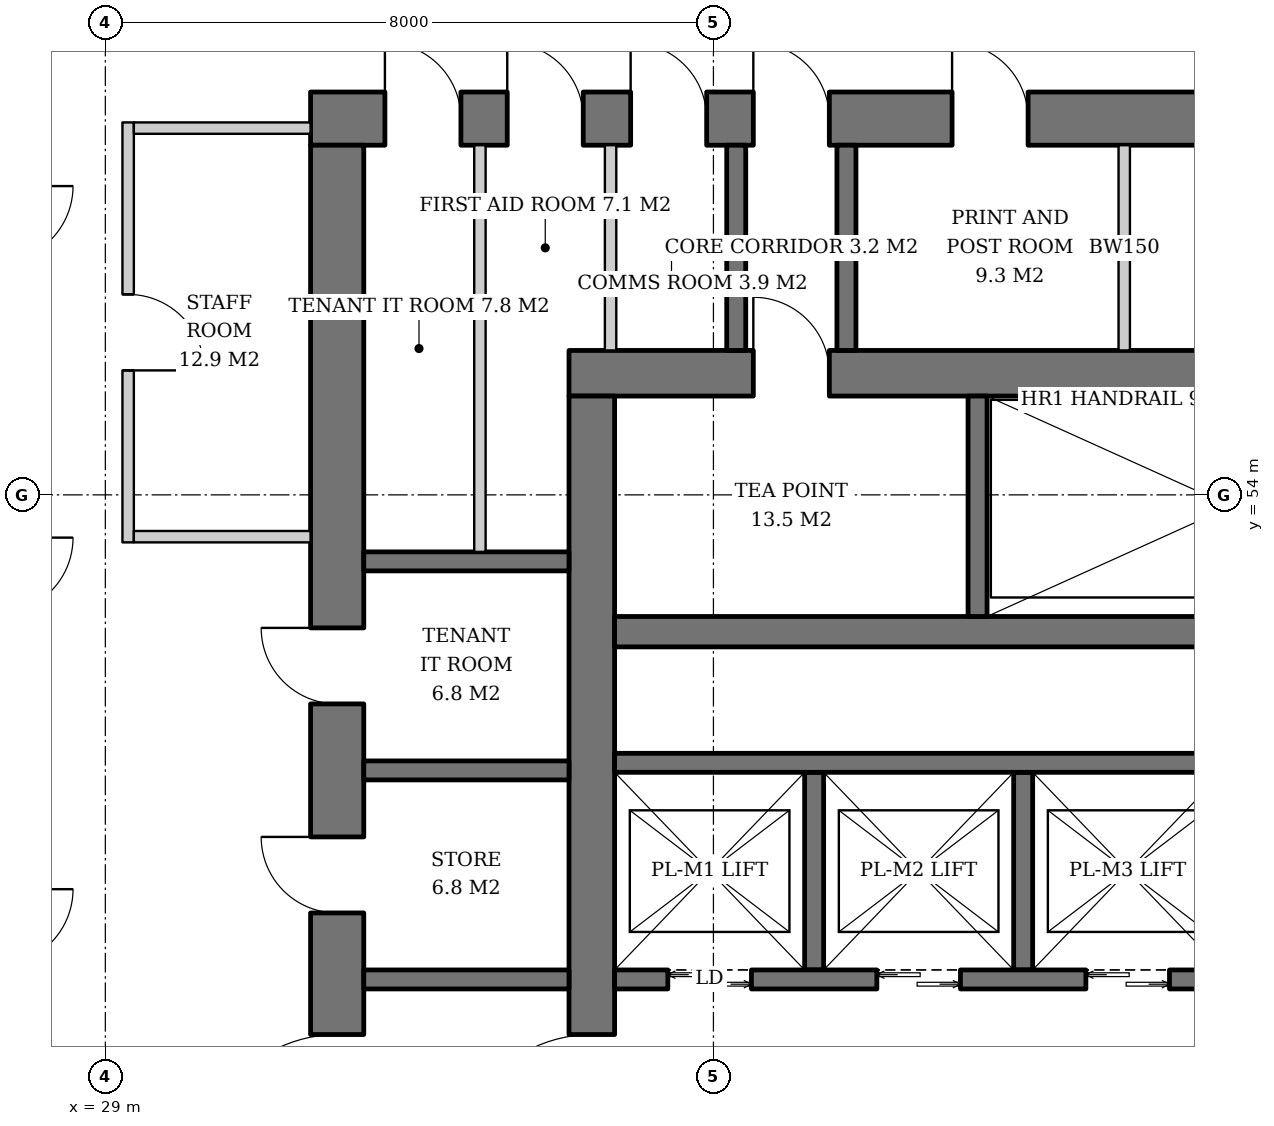
"""IFC4 building model, lengths in metres.
Left out: names, types, materials, properties, quantities, classifications, styles, units other than length and angle.
Written with IfcOpenShell. Run it as: python <this file> out.ifc"""

import sys

from ifc_helpers import new_model, si_unit, direction, frame, frame_2d, origin, place, context, subcontext, project, spatial, rectangle, extrude, element, fill, save


model = new_model("IFC4")
c1 = context("Model", 3, precision=1e-05, world=origin(), true_north=direction((0.0, 1.0)))
c2 = subcontext(c1, "Body", "Model", "MODEL_VIEW")
j1 = project(units=[si_unit("LENGTHUNIT", "METRE"), si_unit("PLANEANGLEUNIT", "RADIAN")], contexts=[c1])
p1 = place(None, origin())
s1 = spatial("IfcSite", under=j1, at=p1, CompositionType="ELEMENT")
p2 = place(p1, origin())
s2 = spatial("IfcBuilding", under=s1, at=p2, CompositionType="ELEMENT")
p3 = place(p2, frame((0.0, 0.0, 142.6)))
s3 = spatial("IfcBuildingStorey", under=s2, at=p3, CompositionType="ELEMENT", Elevation=142.6)
p4 = place(p3, frame((35.1, 55.6, 0.0), z_axis=(0.0, 0.0, 1.0), x_axis=(1.0, 0.0, 0.0)))
e1 = element("IfcWall", 1, at=p4, inside=s3, PredefinedType="SHEAR", context=c2, shape_type="SweptSolid", body=[
    extrude(rectangle(XDim=19.8, YDim=0.6, at=frame_2d((9.9, 0.0))), origin(), (0.0, 0.0, 1.0), 3.8),
])
p5 = place(p4, frame((14.54, 0.0, 0.0)))
e2 = element("IfcOpeningElement", 2, at=p5, cuts=e1, PredefinedType="OPENING", context=c2, shape_type="SweptSolid", body=[
    extrude(rectangle(XDim=1.0, YDim=2.1, at=frame_2d((0.5, 1.05))), frame((0.0, 0.31, 0.0), z_axis=(0.0, -1.0, 0.0), x_axis=(1.0, 0.0, 0.0)), (0.0, 0.0, 1.0), 0.62),
])
p6 = place(p4, frame((2.425, 0.0, 0.0)))
e3 = element("IfcOpeningElement", 3, at=p6, cuts=e1, PredefinedType="OPENING", context=c2, shape_type="SweptSolid", body=[
    extrude(rectangle(XDim=1.0, YDim=2.1, at=frame_2d((0.5, 1.05))), frame((0.0, 0.31, 0.0), z_axis=(0.0, -1.0, 0.0), x_axis=(1.0, 0.0, 0.0)), (0.0, 0.0, 1.0), 0.62),
])
p7 = place(p3, frame((35.4, 36.7, 0.0), z_axis=(0.0, 0.0, 1.0), x_axis=(0.0, 1.0, 0.0)))
e4 = element("IfcWall", 4, at=p7, inside=s3, PredefinedType="SHEAR", context=c2, shape_type="SweptSolid", body=[
    extrude(rectangle(XDim=18.6, YDim=0.6, at=frame_2d((9.3, 0.0))), origin(), (0.0, 0.0, 1.0), 3.8),
])
p8 = place(p7, frame((8.4, 0.0, 0.0)))
e5 = element("IfcOpeningElement", 5, at=p8, cuts=e4, PredefinedType="OPENING", context=c2, shape_type="SweptSolid", body=[
    extrude(rectangle(XDim=1.8, YDim=2.4, at=frame_2d((0.9, 1.2))), frame((0.0, 0.31, 0.0), z_axis=(0.0, -1.0, 0.0), x_axis=(1.0, 0.0, 0.0)), (0.0, 0.0, 1.0), 0.62),
])
p9 = place(p3, frame((31.7, 58.95, 0.0), z_axis=(0.0, 0.0, 1.0), x_axis=(1.0, 0.0, 0.0)))
e6 = element("IfcWall", 6, at=p9, inside=s3, PredefinedType="SHEAR", context=c2, shape_type="SweptSolid", body=[
    extrude(rectangle(XDim=26.6, YDim=0.7, at=frame_2d((13.3, 0.0))), origin(), (0.0, 0.0, 1.0), 3.8),
])
p10 = place(p9, frame((17.94, 0.0, 0.0)))
e7 = element("IfcOpeningElement", 7, at=p10, cuts=e6, PredefinedType="OPENING", context=c2, shape_type="SweptSolid", body=[
    extrude(rectangle(XDim=1.0, YDim=2.1, at=frame_2d((0.5, 1.05))), frame((0.0, 0.36, 0.0), z_axis=(0.0, -1.0, 0.0), x_axis=(1.0, 0.0, 0.0)), (0.0, 0.0, 1.0), 0.72),
])
p11 = place(p9, frame((5.825, 0.0, 0.0)))
e8 = element("IfcOpeningElement", 8, at=p11, cuts=e6, PredefinedType="OPENING", context=c2, shape_type="SweptSolid", body=[
    extrude(rectangle(XDim=1.0, YDim=2.1, at=frame_2d((0.5, 1.05))), frame((0.0, 0.36, 0.0), z_axis=(0.0, -1.0, 0.0), x_axis=(1.0, 0.0, 0.0)), (0.0, 0.0, 1.0), 0.72),
])
p12 = place(p9, frame((0.978, 0.0, 0.0)))
e9 = element("IfcOpeningElement", 9, at=p12, cuts=e6, PredefinedType="OPENING", context=c2, shape_type="SweptSolid", body=[
    extrude(rectangle(XDim=1.0, YDim=2.1, at=frame_2d((0.5, 1.05))), frame((0.0, 0.36, 0.0), z_axis=(0.0, -1.0, 0.0), x_axis=(1.0, 0.0, 0.0)), (0.0, 0.0, 1.0), 0.72),
])
p13 = place(p9, frame((2.587, 0.0, 0.0)))
e10 = element("IfcOpeningElement", 10, at=p13, cuts=e6, PredefinedType="OPENING", context=c2, shape_type="SweptSolid", body=[
    extrude(rectangle(XDim=1.0, YDim=2.1, at=frame_2d((0.5, 1.05))), frame((0.0, 0.36, 0.0), z_axis=(0.0, -1.0, 0.0), x_axis=(1.0, 0.0, 0.0)), (0.0, 0.0, 1.0), 0.72),
])
p14 = place(p9, frame((4.211, 0.0, 0.0)))
e11 = element("IfcOpeningElement", 11, at=p14, cuts=e6, PredefinedType="OPENING", context=c2, shape_type="SweptSolid", body=[
    extrude(rectangle(XDim=1.0, YDim=2.1, at=frame_2d((0.5, 1.05))), frame((0.0, 0.36, 0.0), z_axis=(0.0, -1.0, 0.0), x_axis=(1.0, 0.0, 0.0)), (0.0, 0.0, 1.0), 0.72),
])
p15 = place(p9, frame((8.44, 0.0, 0.0)))
e12 = element("IfcOpeningElement", 12, at=p15, cuts=e6, PredefinedType="OPENING", context=c2, shape_type="SweptSolid", body=[
    extrude(rectangle(XDim=1.0, YDim=2.1, at=frame_2d((0.5, 1.05))), frame((0.0, 0.36, 0.0), z_axis=(0.0, -1.0, 0.0), x_axis=(1.0, 0.0, 0.0)), (0.0, 0.0, 1.0), 0.72),
])
p16 = place(p9, frame((13.342, 0.0, 0.0)))
e13 = element("IfcOpeningElement", 13, at=p16, cuts=e6, PredefinedType="OPENING", context=c2, shape_type="SweptSolid", body=[
    extrude(rectangle(XDim=1.0, YDim=2.1, at=frame_2d((0.5, 1.05))), frame((0.0, 0.36, 0.0), z_axis=(0.0, -1.0, 0.0), x_axis=(1.0, 0.0, 0.0)), (0.0, 0.0, 1.0), 0.72),
])
p17 = place(p9, frame((22.4, 0.0, 0.0)))
e14 = element("IfcOpeningElement", 14, at=p17, cuts=e6, PredefinedType="OPENING", context=c2, shape_type="SweptSolid", body=[
    extrude(rectangle(XDim=1.0, YDim=2.1, at=frame_2d((0.5, 1.05))), frame((0.0, 0.36, 0.0), z_axis=(0.0, -1.0, 0.0), x_axis=(1.0, 0.0, 0.0)), (0.0, 0.0, 1.0), 0.72),
])
p18 = place(p3, frame((32.05, 33.4, 0.0), z_axis=(0.0, 0.0, 1.0), x_axis=(0.0, 1.0, 0.0)))
e15 = element("IfcWall", 15, at=p18, inside=s3, PredefinedType="SHEAR", context=c2, shape_type="SweptSolid", body=[
    extrude(rectangle(XDim=25.2, YDim=0.7, at=frame_2d((12.6, 0.0))), origin(), (0.0, 0.0, 1.0), 3.8),
])
p19 = place(p18, frame((11.7, 0.0, 0.0)))
e16 = element("IfcOpeningElement", 16, at=p19, cuts=e15, PredefinedType="OPENING", context=c2, shape_type="SweptSolid", body=[
    extrude(rectangle(XDim=1.8, YDim=2.4, at=frame_2d((0.9, 1.2))), frame((0.0, 0.36, 0.0), z_axis=(0.0, -1.0, 0.0), x_axis=(1.0, 0.0, 0.0)), (0.0, 0.0, 1.0), 0.72),
])
p20 = place(p18, frame((3.6, 0.0, 0.0)))
e17 = element("IfcOpeningElement", 17, at=p20, cuts=e15, PredefinedType="OPENING", context=c2, shape_type="SweptSolid", body=[
    extrude(rectangle(XDim=1.0, YDim=2.1, at=frame_2d((0.5, 1.05))), frame((0.0, 0.36, 0.0), z_axis=(0.0, -1.0, 0.0), x_axis=(1.0, 0.0, 0.0)), (0.0, 0.0, 1.0), 0.72),
])
p21 = place(p18, frame((6.35, 0.0, 0.0)))
e18 = element("IfcOpeningElement", 18, at=p21, cuts=e15, PredefinedType="OPENING", context=c2, shape_type="SweptSolid", body=[
    extrude(rectangle(XDim=1.0, YDim=2.1, at=frame_2d((0.5, 1.05))), frame((0.0, 0.36, 0.0), z_axis=(0.0, -1.0, 0.0), x_axis=(1.0, 0.0, 0.0)), (0.0, 0.0, 1.0), 0.72),
])
p22 = place(p18, frame((9.1, 0.0, 0.0)))
e19 = element("IfcOpeningElement", 19, at=p22, cuts=e15, PredefinedType="OPENING", context=c2, shape_type="SweptSolid", body=[
    extrude(rectangle(XDim=1.0, YDim=2.1, at=frame_2d((0.5, 1.05))), frame((0.0, 0.36, 0.0), z_axis=(0.0, -1.0, 0.0), x_axis=(1.0, 0.0, 0.0)), (0.0, 0.0, 1.0), 0.72),
])
p23 = place(p18, frame((15.1, 0.0, 0.0)))
e20 = element("IfcOpeningElement", 20, at=p23, cuts=e15, PredefinedType="OPENING", context=c2, shape_type="SweptSolid", body=[
    extrude(rectangle(XDim=1.0, YDim=2.1, at=frame_2d((0.5, 1.05))), frame((0.0, 0.36, 0.0), z_axis=(0.0, -1.0, 0.0), x_axis=(1.0, 0.0, 0.0)), (0.0, 0.0, 1.0), 0.72),
])
p24 = place(p18, frame((17.85, 0.0, 0.0)))
e21 = element("IfcOpeningElement", 21, at=p24, cuts=e15, PredefinedType="OPENING", context=c2, shape_type="SweptSolid", body=[
    extrude(rectangle(XDim=1.0, YDim=2.1, at=frame_2d((0.5, 1.05))), frame((0.0, 0.36, 0.0), z_axis=(0.0, -1.0, 0.0), x_axis=(1.0, 0.0, 0.0)), (0.0, 0.0, 1.0), 0.72),
])
p25 = place(p3, frame((35.7, 52.2, 0.0), z_axis=(0.0, 0.0, 1.0), x_axis=(1.0, 0.0, 0.0)))
e22 = element("IfcWall", 22, at=p25, inside=s3, PredefinedType="SHEAR", context=c2, shape_type="SweptSolid", body=[
    extrude(rectangle(XDim=18.6, YDim=0.4, at=frame_2d((9.3, 0.0))), origin(), (0.0, 0.0, 1.0), 3.8),
])
p26 = place(p3, frame((40.475, 52.4, 0.0), z_axis=(0.0, 0.0, 1.0), x_axis=(0.0, 1.0, 0.0)))
e23 = element("IfcWall", 23, at=p26, inside=s3, PredefinedType="SHEAR", context=c2, shape_type="SweptSolid", body=[
    extrude(rectangle(XDim=2.9, YDim=0.25, at=frame_2d((1.45, 0.0))), origin(), (0.0, 0.0, 1.0), 3.8),
])
for number, where, z_axis, x_axis in (
    (24, (38.325, 47.75, 0.0), (0.0, 0.0, 1.0), (0.0, 1.0, 0.0)),
    (25, (41.075, 47.75, 0.0), (0.0, 0.0, 1.0), (0.0, 1.0, 0.0)),
):
    element("IfcWall", number, at=place(p3, frame(where, z_axis=z_axis, x_axis=x_axis)), inside=s3, PredefinedType="SHEAR", context=c2, shape_type="SweptSolid", body=[
        extrude(rectangle(XDim=2.6, YDim=0.25, at=frame_2d((1.3, 0.0))), origin(), (0.0, 0.0, 1.0), 3.8),
    ])
p27 = place(p3, frame((35.7, 50.475, 0.0), z_axis=(0.0, 0.0, 1.0), x_axis=(1.0, 0.0, 0.0)))
e26 = element("IfcWall", 26, at=p27, inside=s3, PredefinedType="SHEAR", context=c2, shape_type="SweptSolid", body=[
    extrude(rectangle(XDim=11.0, YDim=0.25, at=frame_2d((5.5, 0.0))), origin(), (0.0, 0.0, 1.0), 3.8),
])
p28 = place(p3, frame((35.7, 47.625, 0.0), z_axis=(0.0, 0.0, 1.0), x_axis=(1.0, 0.0, 0.0)))
e27 = element("IfcWall", 27, at=p28, inside=s3, PredefinedType="SHEAR", context=c2, shape_type="SweptSolid", body=[
    extrude(rectangle(XDim=12.83, YDim=0.25, at=frame_2d((6.415, 0.0))), origin(), (0.0, 0.0, 1.0), 3.8),
])
p29 = place(p28, frame((0.7, 0.0, 0.0)))
e28 = element("IfcOpeningElement", 28, at=p29, cuts=e27, PredefinedType="OPENING", context=c2, shape_type="SweptSolid", body=[
    extrude(rectangle(XDim=1.1, YDim=2.2, at=frame_2d((0.55, 1.1))), frame((0.0, 0.135, 0.0), z_axis=(0.0, -1.0, 0.0), x_axis=(1.0, 0.0, 0.0)), (0.0, 0.0, 1.0), 0.27),
])
p30 = place(p28, frame((3.45, 0.0, 0.0)))
e29 = element("IfcOpeningElement", 29, at=p30, cuts=e27, PredefinedType="OPENING", context=c2, shape_type="SweptSolid", body=[
    extrude(rectangle(XDim=1.1, YDim=2.2, at=frame_2d((0.55, 1.1))), frame((0.0, 0.135, 0.0), z_axis=(0.0, -1.0, 0.0), x_axis=(1.0, 0.0, 0.0)), (0.0, 0.0, 1.0), 0.27),
])
p31 = place(p28, frame((6.2, 0.0, 0.0)))
e30 = element("IfcOpeningElement", 30, at=p31, cuts=e27, PredefinedType="OPENING", context=c2, shape_type="SweptSolid", body=[
    extrude(rectangle(XDim=1.1, YDim=2.2, at=frame_2d((0.55, 1.1))), frame((0.0, 0.135, 0.0), z_axis=(0.0, -1.0, 0.0), x_axis=(1.0, 0.0, 0.0)), (0.0, 0.0, 1.0), 0.27),
])
p32 = place(p28, frame((8.95, 0.0, 0.0)))
e31 = element("IfcOpeningElement", 31, at=p32, cuts=e27, PredefinedType="OPENING", context=c2, shape_type="SweptSolid", body=[
    extrude(rectangle(XDim=1.1, YDim=2.2, at=frame_2d((0.55, 1.1))), frame((0.0, 0.135, 0.0), z_axis=(0.0, -1.0, 0.0), x_axis=(1.0, 0.0, 0.0)), (0.0, 0.0, 1.0), 0.27),
])
p33 = place(p28, frame((11.515, 0.0, 0.0)))
e32 = element("IfcOpeningElement", 32, at=p33, cuts=e27, PredefinedType="OPENING", context=c2, shape_type="SweptSolid", body=[
    extrude(rectangle(XDim=0.8, YDim=2.0, at=frame_2d((0.4, 1.0))), frame((0.0, 0.135, 0.0), z_axis=(0.0, -1.0, 0.0), x_axis=(1.0, 0.0, 0.0)), (0.0, 0.0, 1.0), 0.27),
])
for number, where, z_axis, x_axis in (
    (33, (32.4, 47.625, 0.0), (0.0, 0.0, 1.0), (1.0, 0.0, 0.0)),
    (34, (32.4, 50.375, 0.0), (0.0, 0.0, 1.0), (1.0, 0.0, 0.0)),
    (35, (32.4, 53.125, 0.0), (0.0, 0.0, 1.0), (1.0, 0.0, 0.0)),
):
    element("IfcWall", number, at=place(p3, frame(where, z_axis=z_axis, x_axis=x_axis)), inside=s3, PredefinedType="SHEAR", context=c2, shape_type="SweptSolid", body=[
        extrude(rectangle(XDim=2.7, YDim=0.25, at=frame_2d((1.35, 0.0))), origin(), (0.0, 0.0, 1.0), 3.8),
    ])
for number, where, z_axis, x_axis in (
    (36, (37.3, 55.9, 0.0), (0.0, 0.0, 1.0), (0.0, 1.0, 0.0)),
    (37, (38.75, 55.9, 0.0), (0.0, 0.0, 1.0), (0.0, 1.0, 0.0)),
):
    element("IfcWall", number, at=place(p3, frame(where, z_axis=z_axis, x_axis=x_axis)), inside=s3, PredefinedType="SOLIDWALL", context=c2, shape_type="SweptSolid", body=[
        extrude(rectangle(XDim=2.7, YDim=0.25, at=frame_2d((1.35, 0.0))), origin(), (0.0, 0.0, 1.0), 3.62),
    ])
p34 = place(p3, frame((33.928, 53.25, 0.0), z_axis=(0.0, 0.0, 1.0), x_axis=(0.0, 1.0, 0.0)))
e38 = element("IfcWall", 38, at=p34, inside=s3, PredefinedType="SOLIDWALL", context=c2, shape_type="SweptSolid", body=[
    extrude(rectangle(XDim=5.35, YDim=0.15, at=frame_2d((2.675, 0.0))), origin(), (0.0, 0.0, 1.0), 3.62),
])
for number, where, z_axis, x_axis in (
    (39, (35.647, 55.9, 0.0), (0.0, 0.0, 1.0), (0.0, 1.0, 0.0)),
    (40, (42.405, 55.9, 0.0), (0.0, 0.0, 1.0), (0.0, 1.0, 0.0)),
):
    element("IfcWall", number, at=place(p3, frame(where, z_axis=z_axis, x_axis=x_axis)), inside=s3, PredefinedType="SOLIDWALL", context=c2, shape_type="SweptSolid", body=[
        extrude(rectangle(XDim=2.7, YDim=0.15, at=frame_2d((1.35, 0.0))), origin(), (0.0, 0.0, 1.0), 3.62),
    ])
p35 = place(p3, frame((29.3, 58.9, 0.0), z_axis=(0.0, 0.0, 1.0), x_axis=(0.0, -1.0, 0.0)))
e41 = element("IfcWall", 41, at=p35, inside=s3, PredefinedType="PARTITIONING", context=c2, shape_type="SweptSolid", body=[
    extrude(rectangle(XDim=5.525, YDim=0.15, at=frame_2d((2.762, 0.0))), origin(), (0.0, 0.0, 1.0), 2.72),
])
p36 = place(p35, frame((2.262, 0.0, 0.0)))
e42 = element("IfcOpeningElement", 42, at=p36, cuts=e41, PredefinedType="OPENING", context=c2, shape_type="SweptSolid", body=[
    extrude(rectangle(XDim=1.0, YDim=2.1, at=frame_2d((0.5, 1.05))), frame((0.0, 0.085, 0.0), z_axis=(0.0, -1.0, 0.0), x_axis=(1.0, 0.0, 0.0)), (0.0, 0.0, 1.0), 0.17),
])
p37 = place(p3, frame((31.7, 58.825, 0.0), z_axis=(0.0, 0.0, 1.0), x_axis=(-1.0, 0.0, 0.0)))
e43 = element("IfcWall", 43, at=p37, inside=s3, PredefinedType="PARTITIONING", context=c2, shape_type="SweptSolid", body=[
    extrude(rectangle(XDim=2.325, YDim=0.15, at=frame_2d((1.163, 0.0))), origin(), (0.0, 0.0, 1.0), 2.72),
])
p38 = place(p3, frame((31.7, 53.45, 0.0), z_axis=(0.0, 0.0, 1.0), x_axis=(-1.0, 0.0, 0.0)))
e44 = element("IfcWall", 44, at=p38, inside=s3, PredefinedType="PARTITIONING", context=c2, shape_type="SweptSolid", body=[
    extrude(rectangle(XDim=2.325, YDim=0.15, at=frame_2d((1.163, 0.0))), origin(), (0.0, 0.0, 1.0), 3.62),
])
p39 = place(p29, origin())
e45 = element("IfcDoor", 45, at=p39, inside=s3, OperationType="DOUBLE_DOOR_SLIDING", PredefinedType="DOOR", context=c2, shape_type="SweptSolid", body=[
    extrude(rectangle(XDim=1.1, YDim=2.2, at=frame_2d((0.55, 1.1))), frame((0.0, 0.025, 0.0), z_axis=(0.0, -1.0, 0.0), x_axis=(1.0, 0.0, 0.0)), (0.0, 0.0, 1.0), 0.05),
])
fill(e28, e45)
p40 = place(p30, origin())
e46 = element("IfcDoor", 46, at=p40, inside=s3, OperationType="DOUBLE_DOOR_SLIDING", PredefinedType="DOOR", context=c2, shape_type="SweptSolid", body=[
    extrude(rectangle(XDim=1.1, YDim=2.2, at=frame_2d((0.55, 1.1))), frame((0.0, 0.025, 0.0), z_axis=(0.0, -1.0, 0.0), x_axis=(1.0, 0.0, 0.0)), (0.0, 0.0, 1.0), 0.05),
])
fill(e29, e46)
p41 = place(p31, origin())
e47 = element("IfcDoor", 47, at=p41, inside=s3, OperationType="DOUBLE_DOOR_SLIDING", PredefinedType="DOOR", context=c2, shape_type="SweptSolid", body=[
    extrude(rectangle(XDim=1.1, YDim=2.2, at=frame_2d((0.55, 1.1))), frame((0.0, 0.025, 0.0), z_axis=(0.0, -1.0, 0.0), x_axis=(1.0, 0.0, 0.0)), (0.0, 0.0, 1.0), 0.05),
])
fill(e30, e47)
p42 = place(p8, origin())
e48 = element("IfcDoor", 48, at=p42, inside=s3, OperationType="DOUBLE_DOOR_SINGLE_SWING", PredefinedType="DOOR", context=c2, shape_type="SweptSolid", body=[
    extrude(rectangle(XDim=1.8, YDim=2.4, at=frame_2d((0.9, 1.2))), frame((0.0, 0.025, 0.0), z_axis=(0.0, -1.0, 0.0), x_axis=(1.0, 0.0, 0.0)), (0.0, 0.0, 1.0), 0.05),
])
fill(e5, e48)
p43 = place(p19, origin())
e49 = element("IfcDoor", 49, at=p43, inside=s3, OperationType="DOUBLE_DOOR_SINGLE_SWING", PredefinedType="DOOR", context=c2, shape_type="SweptSolid", body=[
    extrude(rectangle(XDim=1.8, YDim=2.4, at=frame_2d((0.9, 1.2))), frame((0.0, 0.025, 0.0), z_axis=(0.0, -1.0, 0.0), x_axis=(1.0, 0.0, 0.0)), (0.0, 0.0, 1.0), 0.05),
])
fill(e16, e49)
p44 = place(p11, origin())
e50 = element("IfcDoor", 50, at=p44, inside=s3, OperationType="SINGLE_SWING_LEFT", PredefinedType="DOOR", context=c2, shape_type="SweptSolid", body=[
    extrude(rectangle(XDim=1.0, YDim=2.1, at=frame_2d((0.5, 1.05))), frame((0.0, 0.025, 0.0), z_axis=(0.0, -1.0, 0.0), x_axis=(1.0, 0.0, 0.0)), (0.0, 0.0, 1.0), 0.05),
])
fill(e8, e50)
p45 = place(p6, origin())
e51 = element("IfcDoor", 51, at=p45, inside=s3, OperationType="SINGLE_SWING_LEFT", PredefinedType="DOOR", context=c2, shape_type="SweptSolid", body=[
    extrude(rectangle(XDim=1.0, YDim=2.1, at=frame_2d((0.5, 1.05))), frame((0.0, -0.24, 0.0), z_axis=(0.0, -1.0, 0.0), x_axis=(1.0, 0.0, 0.0)), (0.0, 0.0, 1.0), 0.05),
])
fill(e3, e51)
p46 = place(p23, origin())
e52 = element("IfcDoor", 52, at=p46, inside=s3, OperationType="SINGLE_SWING_RIGHT", PredefinedType="DOOR", context=c2, shape_type="SweptSolid", body=[
    extrude(rectangle(XDim=1.0, YDim=2.1, at=frame_2d((0.5, 1.05))), frame((0.0, -0.29, 0.0), z_axis=(0.0, -1.0, 0.0), x_axis=(1.0, 0.0, 0.0)), (0.0, 0.0, 1.0), 0.05),
])
fill(e20, e52)
p47 = place(p24, origin())
e53 = element("IfcDoor", 53, at=p47, inside=s3, OperationType="SINGLE_SWING_RIGHT", PredefinedType="DOOR", context=c2, shape_type="SweptSolid", body=[
    extrude(rectangle(XDim=1.0, YDim=2.1, at=frame_2d((0.5, 1.05))), frame((0.0, -0.29, 0.0), z_axis=(0.0, -1.0, 0.0), x_axis=(1.0, 0.0, 0.0)), (0.0, 0.0, 1.0), 0.05),
])
fill(e21, e53)
p48 = place(p12, origin())
e54 = element("IfcDoor", 54, at=p48, inside=s3, OperationType="SINGLE_SWING_LEFT", PredefinedType="DOOR", context=c2, shape_type="SweptSolid", body=[
    extrude(rectangle(XDim=1.0, YDim=2.1, at=frame_2d((0.5, 1.05))), frame((0.0, -0.29, 0.0), z_axis=(0.0, -1.0, 0.0), x_axis=(1.0, 0.0, 0.0)), (0.0, 0.0, 1.0), 0.05),
])
fill(e9, e54)
p49 = place(p13, origin())
e55 = element("IfcDoor", 55, at=p49, inside=s3, OperationType="SINGLE_SWING_LEFT", PredefinedType="DOOR", context=c2, shape_type="SweptSolid", body=[
    extrude(rectangle(XDim=1.0, YDim=2.1, at=frame_2d((0.5, 1.05))), frame((0.0, -0.29, 0.0), z_axis=(0.0, -1.0, 0.0), x_axis=(1.0, 0.0, 0.0)), (0.0, 0.0, 1.0), 0.05),
])
fill(e10, e55)
p50 = place(p14, origin())
e56 = element("IfcDoor", 56, at=p50, inside=s3, OperationType="SINGLE_SWING_LEFT", PredefinedType="DOOR", context=c2, shape_type="SweptSolid", body=[
    extrude(rectangle(XDim=1.0, YDim=2.1, at=frame_2d((0.5, 1.05))), frame((0.0, -0.29, 0.0), z_axis=(0.0, -1.0, 0.0), x_axis=(1.0, 0.0, 0.0)), (0.0, 0.0, 1.0), 0.05),
])
fill(e11, e56)
p51 = place(p15, origin())
e57 = element("IfcDoor", 57, at=p51, inside=s3, OperationType="SINGLE_SWING_LEFT", PredefinedType="DOOR", context=c2, shape_type="SweptSolid", body=[
    extrude(rectangle(XDim=1.0, YDim=2.1, at=frame_2d((0.5, 1.05))), frame((0.0, -0.29, 0.0), z_axis=(0.0, -1.0, 0.0), x_axis=(1.0, 0.0, 0.0)), (0.0, 0.0, 1.0), 0.05),
])
fill(e12, e57)
p52 = place(p36, origin())
e58 = element("IfcDoor", 58, at=p52, inside=s3, OperationType="SINGLE_SWING_RIGHT", PredefinedType="DOOR", context=c2, shape_type="SweptSolid", body=[
    extrude(rectangle(XDim=1.0, YDim=2.1, at=frame_2d((0.5, 1.05))), frame((0.0, 0.025, 0.0), z_axis=(0.0, -1.0, 0.0), x_axis=(1.0, 0.0, 0.0)), (0.0, 0.0, 1.0), 0.05),
])
fill(e42, e58)
save(model, sys.argv[1])
